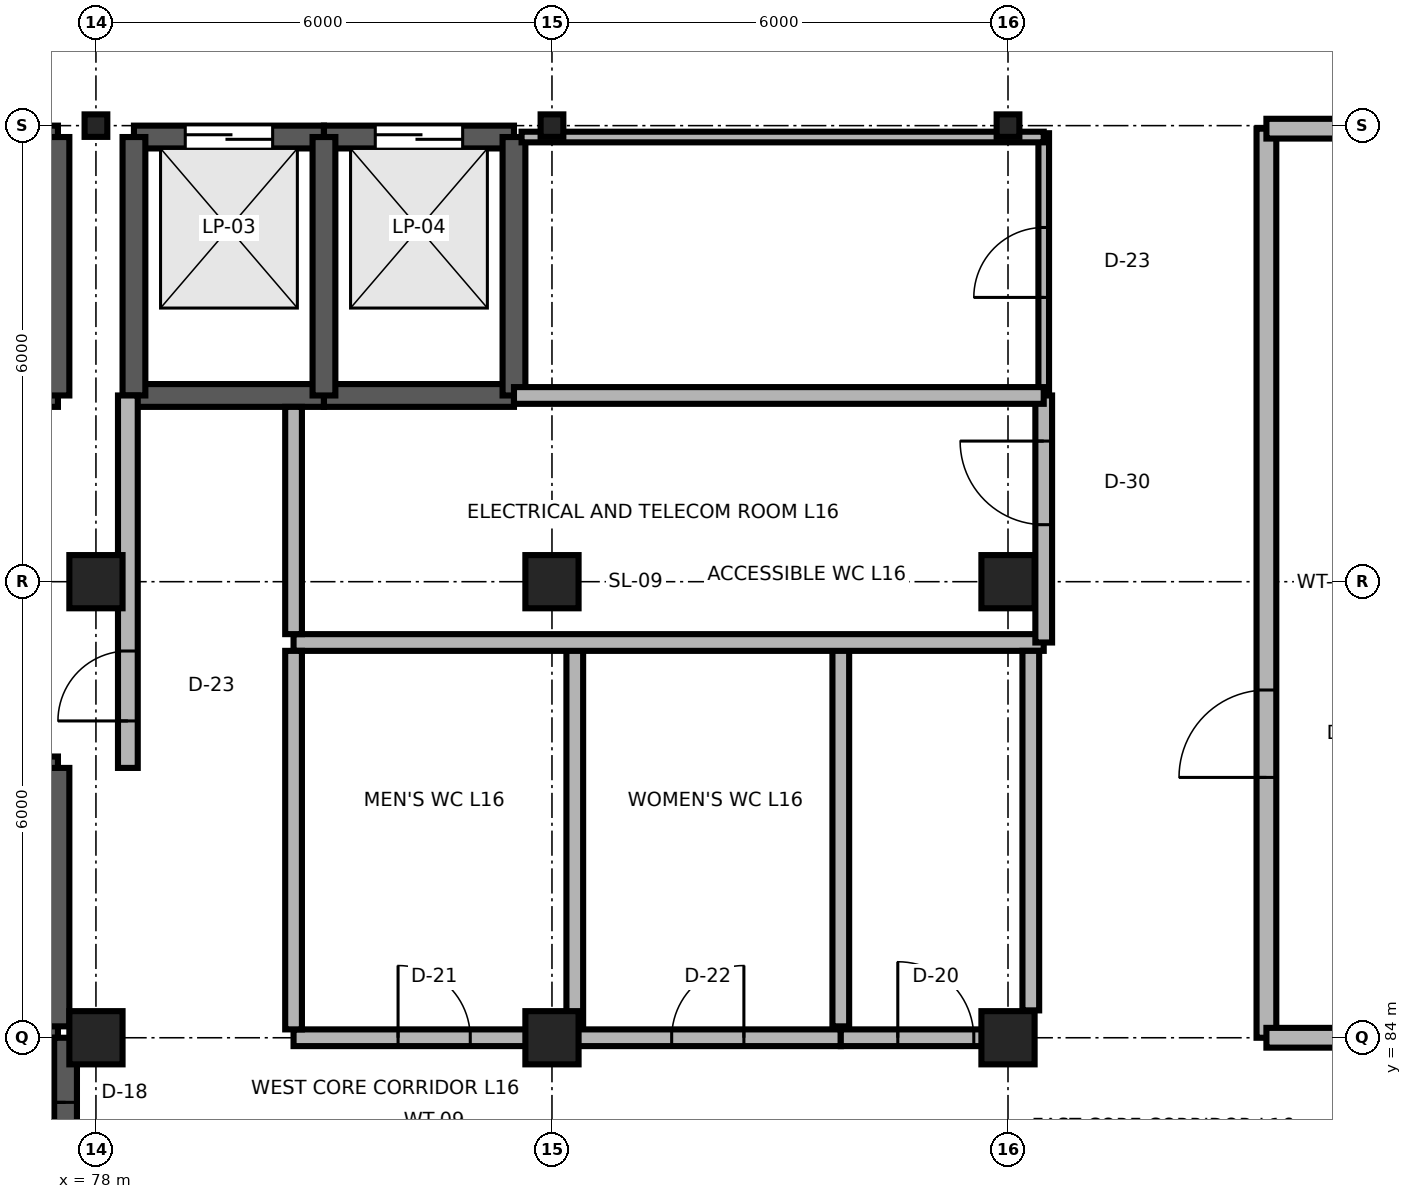
"""IFC4 building model, lengths in metres.
Left out: names, types, materials, properties, quantities, classifications, styles, units other than length and angle.
Written with IfcOpenShell. Run it as: python <this file> out.ifc"""

import sys

from ifc_helpers import new_model, si_unit, direction, frame, frame_2d, origin, origin_2d, place, context, subcontext, project, spatial, rectangle, i_section, extrude, element, fill, save


model = new_model("IFC4")
c1 = context("Model", 3, precision=1e-05, world=origin(), true_north=direction((0.0, 1.0)))
c2 = subcontext(c1, "Body", "Model", "MODEL_VIEW")
j1 = project(units=[si_unit("LENGTHUNIT", "METRE"), si_unit("PLANEANGLEUNIT", "RADIAN")], contexts=[c1])
p1 = place(None, origin())
s1 = spatial("IfcSite", under=j1, at=p1, CompositionType="ELEMENT")
p2 = place(p1, origin())
s2 = spatial("IfcBuilding", under=s1, at=p2, CompositionType="ELEMENT")
p3 = place(p2, frame((0.0, 0.0, 63.9)))
s3 = spatial("IfcBuildingStorey", under=s2, at=p3, CompositionType="ELEMENT", Elevation=63.9)
for number, where, z_axis, x_axis in (
    (1, (78.0, 84.0, 0.0), (0.0, 0.0, 1.0), (1.0, 0.0, 0.0)),
    (2, (84.0, 84.0, 0.0), (0.0, 0.0, 1.0), (1.0, 0.0, 0.0)),
    (3, (90.0, 84.0, 0.0), (0.0, 0.0, 1.0), (1.0, 0.0, 0.0)),
    (4, (78.0, 90.0, 0.0), (0.0, 0.0, 1.0), (1.0, 0.0, 0.0)),
    (5, (84.0, 90.0, 0.0), (0.0, 0.0, 1.0), (1.0, 0.0, 0.0)),
    (6, (90.0, 90.0, 0.0), (0.0, 0.0, 1.0), (1.0, 0.0, 0.0)),
):
    element("IfcColumn", number, at=place(p3, frame(where, z_axis=z_axis, x_axis=x_axis)), inside=s3, PredefinedType="COLUMN", context=c2, shape_type="SweptSolid", body=[
        extrude(rectangle(XDim=0.7, YDim=0.7, at=origin_2d()), origin(), (0.0, 0.0, 1.0), 3.9),
    ])
for number, where, z_axis, x_axis in (
    (7, (78.0, 96.0, 0.0), (0.0, 0.0, 1.0), (1.0, 0.0, 0.0)),
    (8, (84.0, 96.0, 0.0), (0.0, 0.0, 1.0), (1.0, 0.0, 0.0)),
    (9, (90.0, 96.0, 0.0), (0.0, 0.0, 1.0), (1.0, 0.0, 0.0)),
):
    element("IfcColumn", number, at=place(p3, frame(where, z_axis=z_axis, x_axis=x_axis)), inside=s3, PredefinedType="COLUMN", context=c2, shape_type="SweptSolid", body=[
        extrude(i_section(OverallWidth=0.299, OverallDepth=0.296, WebThickness=0.009, FlangeThickness=0.014, FilletRadius=0.018, at=origin_2d()), origin(), (0.0, 0.0, 1.0), 3.9),
    ])
p4 = place(p3, frame((75.0, 84.15, 0.0), z_axis=(0.0, 0.0, 1.0), x_axis=(1.0, 0.0, 0.0)))
e10 = element("IfcWall", 10, at=p4, inside=s3, PredefinedType="SHEAR", context=c2, shape_type="SweptSolid", body=[
    extrude(rectangle(XDim=2.5, YDim=0.3, at=frame_2d((1.25, 0.0))), origin(), (0.0, 0.0, 1.0), 3.66),
])
p5 = place(p4, frame((0.7, 0.0, 0.0)))
e11 = element("IfcOpeningElement", 11, at=p5, cuts=e10, PredefinedType="OPENING", context=c2, shape_type="SweptSolid", body=[
    extrude(rectangle(XDim=1.1, YDim=2.1, at=frame_2d((0.55, 1.05))), frame((0.0, 0.165, 0.0), z_axis=(0.0, -1.0, 0.0), x_axis=(1.0, 0.0, 0.0)), (0.0, 0.0, 1.0), 0.33),
])
p6 = place(p3, frame((75.0, 87.55, 0.0), z_axis=(0.0, 0.0, 1.0), x_axis=(1.0, 0.0, 0.0)))
e12 = element("IfcWall", 12, at=p6, inside=s3, PredefinedType="SHEAR", context=c2, shape_type="SweptSolid", body=[
    extrude(rectangle(XDim=2.5, YDim=0.3, at=frame_2d((1.25, 0.0))), origin(), (0.0, 0.0, 1.0), 3.66),
])
p7 = place(p3, frame((77.5, 84.15, 0.0), z_axis=(0.0, 0.0, 1.0), x_axis=(0.0, 1.0, 0.0)))
e13 = element("IfcWall", 13, at=p7, inside=s3, PredefinedType="SHEAR", context=c2, shape_type="SweptSolid", body=[
    extrude(rectangle(XDim=3.4, YDim=0.3, at=frame_2d((1.7, 0.0))), origin(), (0.0, 0.0, 1.0), 3.66),
])
p8 = place(p3, frame((75.0, 95.85, 0.0), z_axis=(0.0, 0.0, 1.0), x_axis=(1.0, 0.0, 0.0)))
e14 = element("IfcWall", 14, at=p8, inside=s3, PredefinedType="SHEAR", context=c2, shape_type="SweptSolid", body=[
    extrude(rectangle(XDim=2.5, YDim=0.3, at=frame_2d((1.25, 0.0))), origin(), (0.0, 0.0, 1.0), 3.66),
])
p9 = place(p8, frame((0.675, 0.0, 0.0)))
e15 = element("IfcOpeningElement", 15, at=p9, cuts=e14, PredefinedType="OPENING", context=c2, shape_type="SweptSolid", body=[
    extrude(rectangle(XDim=1.15, YDim=2.15, at=frame_2d((0.575, 1.075))), frame((0.0, 0.165, 0.0), z_axis=(0.0, -1.0, 0.0), x_axis=(1.0, 0.0, 0.0)), (0.0, 0.0, 1.0), 0.33),
])
p10 = place(p3, frame((75.0, 92.45, 0.0), z_axis=(0.0, 0.0, 1.0), x_axis=(1.0, 0.0, 0.0)))
e16 = element("IfcWall", 16, at=p10, inside=s3, PredefinedType="SHEAR", context=c2, shape_type="SweptSolid", body=[
    extrude(rectangle(XDim=2.5, YDim=0.3, at=frame_2d((1.25, 0.0))), origin(), (0.0, 0.0, 1.0), 3.66),
])
p11 = place(p3, frame((77.5, 92.45, 0.0), z_axis=(0.0, 0.0, 1.0), x_axis=(0.0, 1.0, 0.0)))
e17 = element("IfcWall", 17, at=p11, inside=s3, PredefinedType="SHEAR", context=c2, shape_type="SweptSolid", body=[
    extrude(rectangle(XDim=3.4, YDim=0.3, at=frame_2d((1.7, 0.0))), origin(), (0.0, 0.0, 1.0), 3.66),
])
p12 = place(p3, frame((78.5, 95.85, 0.0), z_axis=(0.0, 0.0, 1.0), x_axis=(1.0, 0.0, 0.0)))
e18 = element("IfcWall", 18, at=p12, inside=s3, PredefinedType="SHEAR", context=c2, shape_type="SweptSolid", body=[
    extrude(rectangle(XDim=2.5, YDim=0.3, at=frame_2d((1.25, 0.0))), origin(), (0.0, 0.0, 1.0), 3.66),
])
p13 = place(p12, frame((0.675, 0.0, 0.0)))
e19 = element("IfcOpeningElement", 19, at=p13, cuts=e18, PredefinedType="OPENING", context=c2, shape_type="SweptSolid", body=[
    extrude(rectangle(XDim=1.15, YDim=2.15, at=frame_2d((0.575, 1.075))), frame((0.0, 0.165, 0.0), z_axis=(0.0, -1.0, 0.0), x_axis=(1.0, 0.0, 0.0)), (0.0, 0.0, 1.0), 0.33),
])
p14 = place(p3, frame((78.5, 92.45, 0.0), z_axis=(0.0, 0.0, 1.0), x_axis=(1.0, 0.0, 0.0)))
e20 = element("IfcWall", 20, at=p14, inside=s3, PredefinedType="SHEAR", context=c2, shape_type="SweptSolid", body=[
    extrude(rectangle(XDim=2.5, YDim=0.3, at=frame_2d((1.25, 0.0))), origin(), (0.0, 0.0, 1.0), 3.66),
])
p15 = place(p3, frame((78.5, 92.45, 0.0), z_axis=(0.0, 0.0, 1.0), x_axis=(0.0, 1.0, 0.0)))
e21 = element("IfcWall", 21, at=p15, inside=s3, PredefinedType="SHEAR", context=c2, shape_type="SweptSolid", body=[
    extrude(rectangle(XDim=3.4, YDim=0.3, at=frame_2d((1.7, 0.0))), origin(), (0.0, 0.0, 1.0), 3.66),
])
p16 = place(p3, frame((81.0, 95.85, 0.0), z_axis=(0.0, 0.0, 1.0), x_axis=(1.0, 0.0, 0.0)))
e22 = element("IfcWall", 22, at=p16, inside=s3, PredefinedType="SHEAR", context=c2, shape_type="SweptSolid", body=[
    extrude(rectangle(XDim=2.5, YDim=0.3, at=frame_2d((1.25, 0.0))), origin(), (0.0, 0.0, 1.0), 3.66),
])
p17 = place(p16, frame((0.675, 0.0, 0.0)))
e23 = element("IfcOpeningElement", 23, at=p17, cuts=e22, PredefinedType="OPENING", context=c2, shape_type="SweptSolid", body=[
    extrude(rectangle(XDim=1.15, YDim=2.15, at=frame_2d((0.575, 1.075))), frame((0.0, 0.165, 0.0), z_axis=(0.0, -1.0, 0.0), x_axis=(1.0, 0.0, 0.0)), (0.0, 0.0, 1.0), 0.33),
])
p18 = place(p3, frame((81.0, 92.45, 0.0), z_axis=(0.0, 0.0, 1.0), x_axis=(1.0, 0.0, 0.0)))
e24 = element("IfcWall", 24, at=p18, inside=s3, PredefinedType="SHEAR", context=c2, shape_type="SweptSolid", body=[
    extrude(rectangle(XDim=2.5, YDim=0.3, at=frame_2d((1.25, 0.0))), origin(), (0.0, 0.0, 1.0), 3.66),
])
for number, where, z_axis, x_axis in (
    (25, (81.0, 92.45, 0.0), (0.0, 0.0, 1.0), (0.0, 1.0, 0.0)),
    (26, (83.5, 92.45, 0.0), (0.0, 0.0, 1.0), (0.0, 1.0, 0.0)),
):
    element("IfcWall", number, at=place(p3, frame(where, z_axis=z_axis, x_axis=x_axis)), inside=s3, PredefinedType="SHEAR", context=c2, shape_type="SweptSolid", body=[
        extrude(rectangle(XDim=3.4, YDim=0.3, at=frame_2d((1.7, 0.0))), origin(), (0.0, 0.0, 1.0), 3.66),
    ])
p19 = place(p3, frame((93.4, 84.0, 0.0), z_axis=(0.0, 0.0, 1.0), x_axis=(0.0, 1.0, 0.0)))
e27 = element("IfcWall", 27, at=p19, inside=s3, PredefinedType="PARTITIONING", context=c2, shape_type="SweptSolid", body=[
    extrude(rectangle(XDim=11.96, YDim=0.26, at=frame_2d((5.98, 0.0))), origin(), (0.0, 0.0, 1.0), 3.66),
])
p20 = place(p19, frame((3.425, 0.0, 0.0)))
e28 = element("IfcOpeningElement", 28, at=p20, cuts=e27, PredefinedType="OPENING", context=c2, shape_type="SweptSolid", body=[
    extrude(rectangle(XDim=1.15, YDim=2.2, at=frame_2d((0.575, 1.1))), frame((0.0, 0.145, 0.0), z_axis=(0.0, -1.0, 0.0), x_axis=(1.0, 0.0, 0.0)), (0.0, 0.0, 1.0), 0.29),
])
for number, where, z_axis, x_axis in (
    (29, (93.4, 84.0, 0.0), (0.0, 0.0, 1.0), (1.0, 0.0, 0.0)),
    (30, (93.4, 95.96, 0.0), (0.0, 0.0, 1.0), (1.0, 0.0, 0.0)),
):
    element("IfcWall", number, at=place(p3, frame(where, z_axis=z_axis, x_axis=x_axis)), inside=s3, PredefinedType="PARTITIONING", context=c2, shape_type="SweptSolid", body=[
        extrude(rectangle(XDim=2.25, YDim=0.26, at=frame_2d((1.125, 0.0))), origin(), (0.0, 0.0, 1.0), 3.369),
    ])
p21 = place(p3, frame((77.6, 81.0, 0.0), z_axis=(0.0, 0.0, 1.0), x_axis=(0.0, 1.0, 0.0)))
e31 = element("IfcWall", 31, at=p21, inside=s3, PredefinedType="SHEAR", context=c2, shape_type="SweptSolid", body=[
    extrude(rectangle(XDim=3.0, YDim=0.3, at=frame_2d((1.5, 0.0))), origin(), (0.0, 0.0, 1.0), 3.66),
])
p22 = place(p21, frame((0.85, 0.0, 0.0)))
e32 = element("IfcOpeningElement", 32, at=p22, cuts=e31, PredefinedType="OPENING", context=c2, shape_type="SweptSolid", body=[
    extrude(rectangle(XDim=1.3, YDim=2.2, at=frame_2d((0.65, 1.1))), frame((0.0, 0.165, 0.0), z_axis=(0.0, -1.0, 0.0), x_axis=(1.0, 0.0, 0.0)), (0.0, 0.0, 1.0), 0.33),
])
p23 = place(p3, frame((80.6, 84.0, 0.0), z_axis=(0.0, 0.0, 1.0), x_axis=(1.0, 0.0, 0.0)))
e33 = element("IfcWall", 33, at=p23, inside=s3, PredefinedType="PARTITIONING", context=c2, shape_type="SweptSolid", body=[
    extrude(rectangle(XDim=3.7, YDim=0.22, at=frame_2d((1.85, 0.0))), origin(), (0.0, 0.0, 1.0), 3.369),
])
p24 = place(p23, frame((1.375, 0.0, 0.0)))
e34 = element("IfcOpeningElement", 34, at=p24, cuts=e33, PredefinedType="OPENING", context=c2, shape_type="SweptSolid", body=[
    extrude(rectangle(XDim=0.95, YDim=2.15, at=frame_2d((0.475, 1.075))), frame((0.0, 0.125, 0.0), z_axis=(0.0, -1.0, 0.0), x_axis=(1.0, 0.0, 0.0)), (0.0, 0.0, 1.0), 0.25),
])
p25 = place(p3, frame((84.3, 84.0, 0.0), z_axis=(0.0, 0.0, 1.0), x_axis=(1.0, 0.0, 0.0)))
e35 = element("IfcWall", 35, at=p25, inside=s3, PredefinedType="PARTITIONING", context=c2, shape_type="SweptSolid", body=[
    extrude(rectangle(XDim=3.5, YDim=0.22, at=frame_2d((1.75, 0.0))), origin(), (0.0, 0.0, 1.0), 3.369),
])
p26 = place(p25, frame((1.275, 0.0, 0.0)))
e36 = element("IfcOpeningElement", 36, at=p26, cuts=e35, PredefinedType="OPENING", context=c2, shape_type="SweptSolid", body=[
    extrude(rectangle(XDim=0.95, YDim=2.1, at=frame_2d((0.475, 1.05))), frame((0.0, 0.125, 0.0), z_axis=(0.0, -1.0, 0.0), x_axis=(1.0, 0.0, 0.0)), (0.0, 0.0, 1.0), 0.25),
])
p27 = place(p3, frame((87.8, 84.0, 0.0), z_axis=(0.0, 0.0, 1.0), x_axis=(1.0, 0.0, 0.0)))
e37 = element("IfcWall", 37, at=p27, inside=s3, PredefinedType="PARTITIONING", context=c2, shape_type="SweptSolid", body=[
    extrude(rectangle(XDim=2.5, YDim=0.22, at=frame_2d((1.25, 0.0))), origin(), (0.0, 0.0, 1.0), 3.369),
])
p28 = place(p27, frame((0.75, 0.0, 0.0)))
e38 = element("IfcOpeningElement", 38, at=p28, cuts=e37, PredefinedType="OPENING", context=c2, shape_type="SweptSolid", body=[
    extrude(rectangle(XDim=1.0, YDim=2.15, at=frame_2d((0.5, 1.075))), frame((0.0, 0.125, 0.0), z_axis=(0.0, -1.0, 0.0), x_axis=(1.0, 0.0, 0.0)), (0.0, 0.0, 1.0), 0.25),
])
for number, where, z_axis, x_axis in (
    (39, (84.3, 84.15, 0.0), (0.0, 0.0, 1.0), (0.0, 1.0, 0.0)),
    (40, (87.8, 84.15, 0.0), (0.0, 0.0, 1.0), (0.0, 1.0, 0.0)),
):
    element("IfcWall", number, at=place(p3, frame(where, z_axis=z_axis, x_axis=x_axis)), inside=s3, PredefinedType="PARTITIONING", context=c2, shape_type="SweptSolid", body=[
        extrude(rectangle(XDim=5.0, YDim=0.22, at=frame_2d((2.5, 0.0))), origin(), (0.0, 0.0, 1.0), 3.66),
    ])
p29 = place(p3, frame((80.6, 89.2, 0.0), z_axis=(0.0, 0.0, 1.0), x_axis=(1.0, 0.0, 0.0)))
e41 = element("IfcWall", 41, at=p29, inside=s3, PredefinedType="PARTITIONING", context=c2, shape_type="SweptSolid", body=[
    extrude(rectangle(XDim=9.87, YDim=0.22, at=frame_2d((4.935, 0.0))), origin(), (0.0, 0.0, 1.0), 3.66),
])
p30 = place(p3, frame((90.47, 89.2, 0.0), z_axis=(0.0, 0.0, 1.0), x_axis=(0.0, 1.0, 0.0)))
e42 = element("IfcWall", 42, at=p30, inside=s3, PredefinedType="PARTITIONING", context=c2, shape_type="SweptSolid", body=[
    extrude(rectangle(XDim=3.25, YDim=0.22, at=frame_2d((1.625, 0.0))), origin(), (0.0, 0.0, 1.0), 3.66),
])
p31 = place(p30, frame((1.55, 0.0, 0.0)))
e43 = element("IfcOpeningElement", 43, at=p31, cuts=e42, PredefinedType="OPENING", context=c2, shape_type="SweptSolid", body=[
    extrude(rectangle(XDim=1.1, YDim=2.15, at=frame_2d((0.55, 1.075))), frame((0.0, 0.125, 0.0), z_axis=(0.0, -1.0, 0.0), x_axis=(1.0, 0.0, 0.0)), (0.0, 0.0, 1.0), 0.25),
])
p32 = place(p3, frame((78.42, 87.55, 0.0), z_axis=(0.0, 0.0, 1.0), x_axis=(0.0, 1.0, 0.0)))
e44 = element("IfcWall", 44, at=p32, inside=s3, PredefinedType="PARTITIONING", context=c2, shape_type="SweptSolid", body=[
    extrude(rectangle(XDim=4.9, YDim=0.26, at=frame_2d((2.45, 0.0))), origin(), (0.0, 0.0, 1.0), 3.66),
])
p33 = place(p32, frame((0.618, 0.0, 0.0)))
e45 = element("IfcOpeningElement", 45, at=p33, cuts=e44, PredefinedType="OPENING", context=c2, shape_type="SweptSolid", body=[
    extrude(rectangle(XDim=0.92, YDim=2.15, at=frame_2d((0.46, 1.075))), frame((0.0, 0.145, 0.0), z_axis=(0.0, -1.0, 0.0), x_axis=(1.0, 0.0, 0.0)), (0.0, 0.0, 1.0), 0.29),
])
p34 = place(p3, frame((90.47, 92.5, 0.0), z_axis=(0.0, 0.0, 1.0), x_axis=(0.0, 1.0, 0.0)))
e46 = element("IfcWall", 46, at=p34, inside=s3, PredefinedType="PARTITIONING", context=c2, shape_type="SweptSolid", body=[
    extrude(rectangle(XDim=3.4, YDim=0.14, at=frame_2d((1.7, 0.0))), origin(), (0.0, 0.0, 1.0), 3.66),
])
p35 = place(p34, frame((1.24, 0.0, 0.0)))
e47 = element("IfcOpeningElement", 47, at=p35, cuts=e46, PredefinedType="OPENING", context=c2, shape_type="SweptSolid", body=[
    extrude(rectangle(XDim=0.92, YDim=2.15, at=frame_2d((0.46, 1.075))), frame((0.0, 0.085, 0.0), z_axis=(0.0, -1.0, 0.0), x_axis=(1.0, 0.0, 0.0)), (0.0, 0.0, 1.0), 0.17),
])
p36 = place(p3, frame((83.6, 95.85, 0.0), z_axis=(0.0, 0.0, 1.0), x_axis=(1.0, 0.0, 0.0)))
e48 = element("IfcWall", 48, at=p36, inside=s3, PredefinedType="PARTITIONING", context=c2, shape_type="SweptSolid", body=[
    extrude(rectangle(XDim=6.87, YDim=0.14, at=frame_2d((3.435, 0.0))), origin(), (0.0, 0.0, 1.0), 3.66),
])
p37 = place(p3, frame((80.6, 84.11, 0.0), z_axis=(0.0, 0.0, 1.0), x_axis=(0.0, 1.0, 0.0)))
e49 = element("IfcWall", 49, at=p37, inside=s3, PredefinedType="PARTITIONING", context=c2, shape_type="SweptSolid", body=[
    extrude(rectangle(XDim=4.98, YDim=0.22, at=frame_2d((2.49, 0.0))), origin(), (0.0, 0.0, 1.0), 3.66),
])
p38 = place(p3, frame((90.3, 84.36, 0.0), z_axis=(0.0, 0.0, 1.0), x_axis=(0.0, 1.0, 0.0)))
e50 = element("IfcWall", 50, at=p38, inside=s3, PredefinedType="PARTITIONING", context=c2, shape_type="SweptSolid", body=[
    extrude(rectangle(XDim=4.73, YDim=0.22, at=frame_2d((2.365, 0.0))), origin(), (0.0, 0.0, 1.0), 3.66),
])
p39 = place(p3, frame((80.6, 89.31, 0.0), z_axis=(0.0, 0.0, 1.0), x_axis=(0.0, 1.0, 0.0)))
e51 = element("IfcWall", 51, at=p39, inside=s3, PredefinedType="PARTITIONING", context=c2, shape_type="SweptSolid", body=[
    extrude(rectangle(XDim=2.99, YDim=0.22, at=frame_2d((1.495, 0.0))), origin(), (0.0, 0.0, 1.0), 3.66),
])
p40 = place(p3, frame((83.5, 92.45, 0.0), z_axis=(0.0, 0.0, 1.0), x_axis=(1.0, 0.0, 0.0)))
e52 = element("IfcWall", 52, at=p40, inside=s3, PredefinedType="PARTITIONING", context=c2, shape_type="SweptSolid", body=[
    extrude(rectangle(XDim=6.97, YDim=0.22, at=frame_2d((3.485, 0.0))), origin(), (0.0, 0.0, 1.0), 3.66),
])
p41 = place(p13, origin())
e53 = element("IfcDoor", 53, at=p41, inside=s3, OperationType="DOUBLE_DOOR_SLIDING", PredefinedType="DOOR", context=c2, shape_type="SweptSolid", body=[
    extrude(rectangle(XDim=1.15, YDim=2.15, at=frame_2d((0.575, 1.075))), frame((0.0, 0.025, 0.0), z_axis=(0.0, -1.0, 0.0), x_axis=(1.0, 0.0, 0.0)), (0.0, 0.0, 1.0), 0.05),
])
fill(e19, e53)
p42 = place(p17, origin())
e54 = element("IfcDoor", 54, at=p42, inside=s3, OperationType="DOUBLE_DOOR_SLIDING", PredefinedType="DOOR", context=c2, shape_type="SweptSolid", body=[
    extrude(rectangle(XDim=1.15, YDim=2.15, at=frame_2d((0.575, 1.075))), frame((0.0, 0.025, 0.0), z_axis=(0.0, -1.0, 0.0), x_axis=(1.0, 0.0, 0.0)), (0.0, 0.0, 1.0), 0.05),
])
fill(e23, e54)
p43 = place(p20, origin())
e55 = element("IfcDoor", 55, at=p43, inside=s3, OperationType="SINGLE_SWING_LEFT", PredefinedType="DOOR", context=c2, shape_type="SweptSolid", body=[
    extrude(rectangle(XDim=1.15, YDim=2.2, at=frame_2d((0.575, 1.1))), frame((0.0, 0.025, 0.0), z_axis=(0.0, -1.0, 0.0), x_axis=(1.0, 0.0, 0.0)), (0.0, 0.0, 1.0), 0.05),
])
fill(e28, e55)
p44 = place(p22, origin())
e56 = element("IfcDoor", 56, at=p44, inside=s3, OperationType="SINGLE_SWING_RIGHT", PredefinedType="DOOR", context=c2, shape_type="SweptSolid", body=[
    extrude(rectangle(XDim=1.3, YDim=2.2, at=frame_2d((0.65, 1.1))), frame((0.0, 0.025, 0.0), z_axis=(0.0, -1.0, 0.0), x_axis=(1.0, 0.0, 0.0)), (0.0, 0.0, 1.0), 0.05),
])
fill(e32, e56)
p45 = place(p24, origin())
e57 = element("IfcDoor", 57, at=p45, inside=s3, OperationType="SINGLE_SWING_LEFT", PredefinedType="DOOR", context=c2, shape_type="SweptSolid", body=[
    extrude(rectangle(XDim=0.95, YDim=2.15, at=frame_2d((0.475, 1.075))), frame((0.0, 0.025, 0.0), z_axis=(0.0, -1.0, 0.0), x_axis=(1.0, 0.0, 0.0)), (0.0, 0.0, 1.0), 0.05),
])
fill(e34, e57)
p46 = place(p26, origin())
e58 = element("IfcDoor", 58, at=p46, inside=s3, OperationType="SINGLE_SWING_RIGHT", PredefinedType="DOOR", context=c2, shape_type="SweptSolid", body=[
    extrude(rectangle(XDim=0.95, YDim=2.1, at=frame_2d((0.475, 1.05))), frame((0.0, 0.025, 0.0), z_axis=(0.0, -1.0, 0.0), x_axis=(1.0, 0.0, 0.0)), (0.0, 0.0, 1.0), 0.05),
])
fill(e36, e58)
p47 = place(p28, origin())
e59 = element("IfcDoor", 59, at=p47, inside=s3, OperationType="SINGLE_SWING_LEFT", PredefinedType="DOOR", context=c2, shape_type="SweptSolid", body=[
    extrude(rectangle(XDim=1.0, YDim=2.15, at=frame_2d((0.5, 1.075))), frame((0.0, 0.025, 0.0), z_axis=(0.0, -1.0, 0.0), x_axis=(1.0, 0.0, 0.0)), (0.0, 0.0, 1.0), 0.05),
])
fill(e38, e59)
p48 = place(p31, origin())
e60 = element("IfcDoor", 60, at=p48, inside=s3, OperationType="SINGLE_SWING_RIGHT", PredefinedType="DOOR", context=c2, shape_type="SweptSolid", body=[
    extrude(rectangle(XDim=1.1, YDim=2.15, at=frame_2d((0.55, 1.075))), frame((0.0, 0.025, 0.0), z_axis=(0.0, -1.0, 0.0), x_axis=(1.0, 0.0, 0.0)), (0.0, 0.0, 1.0), 0.05),
])
fill(e43, e60)
p49 = place(p33, origin())
e61 = element("IfcDoor", 61, at=p49, inside=s3, OperationType="SINGLE_SWING_LEFT", PredefinedType="DOOR", context=c2, shape_type="SweptSolid", body=[
    extrude(rectangle(XDim=0.92, YDim=2.15, at=frame_2d((0.46, 1.075))), frame((0.0, 0.025, 0.0), z_axis=(0.0, -1.0, 0.0), x_axis=(1.0, 0.0, 0.0)), (0.0, 0.0, 1.0), 0.05),
])
fill(e45, e61)
p50 = place(p35, origin())
e62 = element("IfcDoor", 62, at=p50, inside=s3, OperationType="SINGLE_SWING_LEFT", PredefinedType="DOOR", context=c2, shape_type="SweptSolid", body=[
    extrude(rectangle(XDim=0.92, YDim=2.15, at=frame_2d((0.46, 1.075))), frame((0.0, 0.025, 0.0), z_axis=(0.0, -1.0, 0.0), x_axis=(1.0, 0.0, 0.0)), (0.0, 0.0, 1.0), 0.05),
])
fill(e47, e62)
save(model, sys.argv[1])
